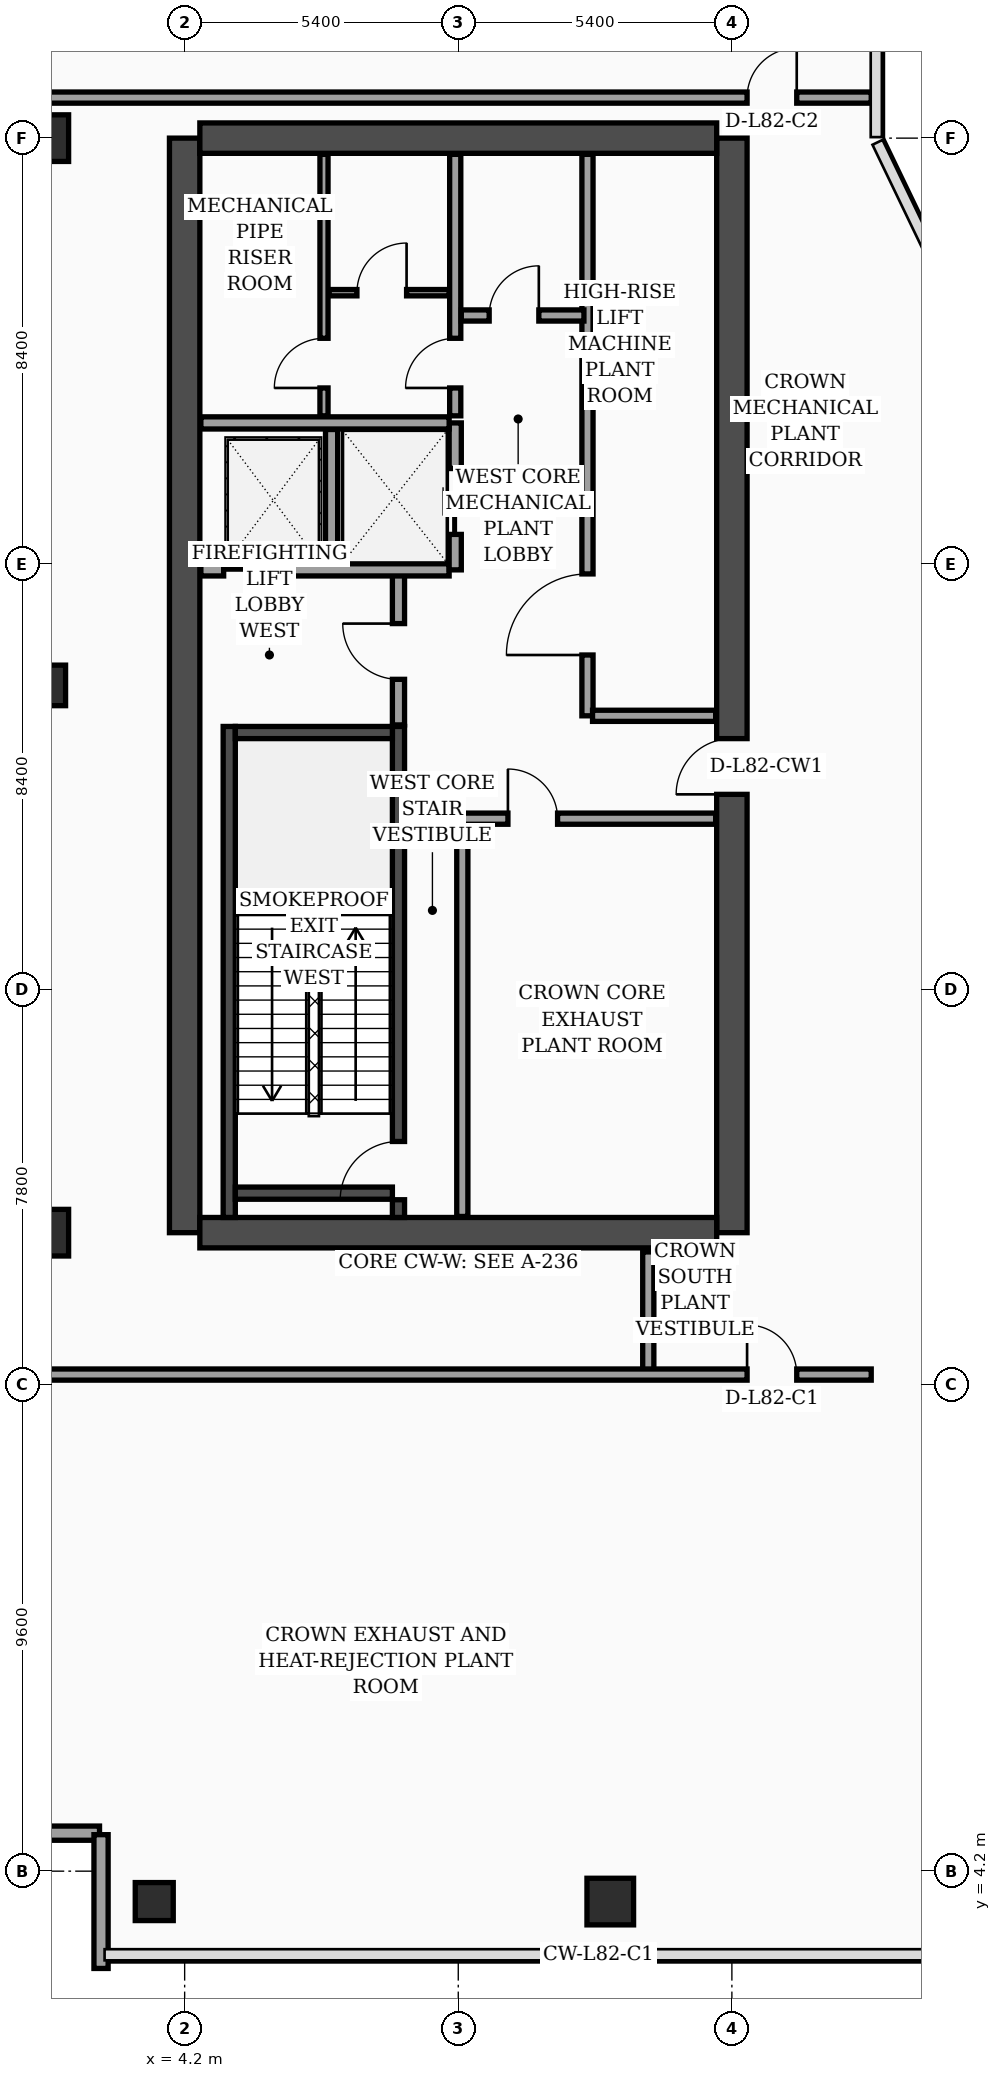
"""IFC4 building model, lengths in metres.
Left out: names, types, materials, properties, quantities, classifications, styles, units other than length and angle.
Written with IfcOpenShell. Run it as: python <this file> out.ifc"""

import sys

from ifc_helpers import new_model, si_unit, direction, frame, frame_2d, origin, origin_2d, place, context, subcontext, project, spatial, rectangle, hollow_rectangle, extrude, element, fill, save


model = new_model("IFC4")
c1 = context("Model", 3, precision=1e-05, world=origin(), true_north=direction((0.0, 1.0)))
c2 = subcontext(c1, "Body", "Model", "MODEL_VIEW")
j1 = project(units=[si_unit("LENGTHUNIT", "METRE"), si_unit("PLANEANGLEUNIT", "RADIAN")], contexts=[c1])
p1 = place(None, origin())
s1 = spatial("IfcSite", under=j1, at=p1, CompositionType="ELEMENT")
p2 = place(p1, origin())
s2 = spatial("IfcBuilding", under=s1, at=p2, CompositionType="ELEMENT")
p3 = place(p2, frame((0.0, 0.0, 335.5)))
s3 = spatial("IfcBuildingStorey", under=s2, at=p3, CompositionType="ELEMENT", Elevation=335.5)
p4 = place(p3, frame((4.2, 16.8, 0.0), z_axis=(0.0, 0.0, 1.0), x_axis=(0.0, 1.0, 0.0)))
e1 = element("IfcWall", 1, at=p4, inside=s3, PredefinedType="SHEAR", context=c2, shape_type="SweptSolid", body=[
    extrude(rectangle(XDim=21.6, YDim=0.6, at=frame_2d((10.8, 0.0))), origin(), (0.0, 0.0, 1.0), 4.76),
])
p5 = place(p3, frame((15.0, 16.8, 0.0), z_axis=(0.0, 0.0, 1.0), x_axis=(0.0, 1.0, 0.0)))
e2 = element("IfcWall", 2, at=p5, inside=s3, PredefinedType="SHEAR", context=c2, shape_type="SweptSolid", body=[
    extrude(rectangle(XDim=21.6, YDim=0.6, at=frame_2d((10.8, 0.0))), origin(), (0.0, 0.0, 1.0), 4.76),
])
p6 = place(p5, frame((8.65, 0.0, 0.0)))
e3 = element("IfcOpeningElement", 3, at=p6, cuts=e2, PredefinedType="OPENING", context=c2, shape_type="SweptSolid", body=[
    extrude(rectangle(XDim=1.1, YDim=2.2, at=frame_2d((0.55, 1.1))), frame((0.0, 0.31, 0.0), z_axis=(0.0, -1.0, 0.0), x_axis=(1.0, 0.0, 0.0)), (0.0, 0.0, 1.0), 0.62),
])
for number, where, z_axis, x_axis in (
    (4, (4.5, 38.4, 0.0), (0.0, 0.0, 1.0), (1.0, 0.0, 0.0)),
    (5, (4.5, 16.8, 0.0), (0.0, 0.0, 1.0), (1.0, 0.0, 0.0)),
):
    element("IfcWall", number, at=place(p3, frame(where, z_axis=z_axis, x_axis=x_axis)), inside=s3, PredefinedType="SHEAR", context=c2, shape_type="SweptSolid", body=[
        extrude(rectangle(XDim=10.2, YDim=0.6, at=frame_2d((5.1, 0.0))), origin(), (0.0, 0.0, 1.0), 4.76),
    ])
p7 = place(p3, frame((5.08, 17.1, 0.0), z_axis=(0.0, 0.0, 1.0), x_axis=(0.0, 1.0, 0.0)))
e6 = element("IfcWall", 6, at=p7, inside=s3, PredefinedType="SOLIDWALL", context=c2, shape_type="SweptSolid", body=[
    extrude(rectangle(XDim=9.69, YDim=0.24, at=frame_2d((4.845, 0.0))), origin(), (0.0, 0.0, 1.0), 4.76),
])
p8 = place(p3, frame((8.42, 17.1, 0.0), z_axis=(0.0, 0.0, 1.0), x_axis=(0.0, 1.0, 0.0)))
e7 = element("IfcWall", 7, at=p8, inside=s3, PredefinedType="SOLIDWALL", context=c2, shape_type="SweptSolid", body=[
    extrude(rectangle(XDim=9.69, YDim=0.24, at=frame_2d((4.845, 0.0))), origin(), (0.0, 0.0, 1.0), 4.76),
])
p9 = place(p8, frame((0.35, 0.0, 0.0)))
e8 = element("IfcOpeningElement", 8, at=p9, cuts=e7, PredefinedType="OPENING", context=c2, shape_type="SweptSolid", body=[
    extrude(rectangle(XDim=1.15, YDim=2.2, at=frame_2d((0.575, 1.1))), frame((0.0, 0.13, 0.0), z_axis=(0.0, -1.0, 0.0), x_axis=(1.0, 0.0, 0.0)), (0.0, 0.0, 1.0), 0.26),
])
for number, where, z_axis, x_axis in (
    (9, (5.2, 17.58, 0.0), (0.0, 0.0, 1.0), (1.0, 0.0, 0.0)),
    (10, (5.2, 26.67, 0.0), (0.0, 0.0, 1.0), (1.0, 0.0, 0.0)),
):
    element("IfcWall", number, at=place(p3, frame(where, z_axis=z_axis, x_axis=x_axis)), inside=s3, PredefinedType="SOLIDWALL", context=c2, shape_type="SweptSolid", body=[
        extrude(rectangle(XDim=3.1, YDim=0.24, at=frame_2d((1.55, 0.0))), origin(), (0.0, 0.0, 1.0), 4.76),
    ])
p10 = place(p3, frame((3.6, 3.6, 0.0), z_axis=(0.0, 0.0, 1.0), x_axis=(1.0, 0.0, 0.0)))
e11 = element("IfcColumn", 11, at=p10, inside=s3, PredefinedType="COLUMN", context=c2, shape_type="SweptSolid", body=[
    extrude(hollow_rectangle(XDim=0.75, YDim=0.75, WallThickness=0.032, at=origin_2d()), origin(), (0.0, 0.0, 1.0), 4.76),
])
p11 = place(p3, frame((1.45, 16.8, 0.0), z_axis=(0.0, 0.0, 1.0), x_axis=(1.0, 0.0, 0.0)))
e12 = element("IfcColumn", 12, at=p11, inside=s3, PredefinedType="COLUMN", context=c2, shape_type="SweptSolid", body=[
    extrude(rectangle(XDim=0.92, YDim=0.92, at=origin_2d()), origin(), (0.0, 0.0, 1.0), 4.76),
])
p12 = place(p3, frame((1.45, 27.6, 0.0), z_axis=(0.0, 0.0, 1.0), x_axis=(1.0, 0.0, 0.0)))
e13 = element("IfcColumn", 13, at=p12, inside=s3, PredefinedType="COLUMN", context=c2, shape_type="SweptSolid", body=[
    extrude(rectangle(XDim=0.8, YDim=0.8, at=origin_2d()), origin(), (0.0, 0.0, 1.0), 4.76),
])
for number, where, z_axis, x_axis in (
    (14, (1.45, 38.4, 0.0), (0.0, 0.0, 1.0), (1.0, 0.0, 0.0)),
    (15, (12.6, 3.6, 0.0), (0.0, 0.0, 1.0), (1.0, 0.0, 0.0)),
):
    element("IfcColumn", number, at=place(p3, frame(where, z_axis=z_axis, x_axis=x_axis)), inside=s3, PredefinedType="COLUMN", context=c2, shape_type="SweptSolid", body=[
        extrude(rectangle(XDim=0.92, YDim=0.92, at=origin_2d()), origin(), (0.0, 0.0, 1.0), 4.76),
    ])
p13 = place(p3, frame((-0.12, 4.95, 0.0), z_axis=(0.0, 0.0, 1.0), x_axis=(1.0, 0.0, 0.0)))
e16 = element("IfcWall", 16, at=p13, inside=s3, PredefinedType="SOLIDWALL", context=c2, shape_type="SweptSolid", body=[
    extrude(rectangle(XDim=2.64, YDim=0.28, at=frame_2d((1.32, 0.0))), origin(), (0.0, 0.0, 1.0), 4.76),
])
p14 = place(p3, frame((2.55, 4.92, 0.0), z_axis=(0.0, 0.0, 1.0), x_axis=(0.0, -1.0, 0.0)))
e17 = element("IfcWall", 17, at=p14, inside=s3, PredefinedType="SOLIDWALL", context=c2, shape_type="SweptSolid", body=[
    extrude(rectangle(XDim=2.64, YDim=0.28, at=frame_2d((1.32, 0.0))), origin(), (0.0, 0.0, 1.0), 4.76),
])
p15 = place(p3, frame((8.42, 26.82, 0.0), z_axis=(0.0, 0.0, 1.0), x_axis=(0.0, 1.0, 0.0)))
e18 = element("IfcWall", 18, at=p15, inside=s3, PredefinedType="SOLIDWALL", context=c2, shape_type="SweptSolid", body=[
    extrude(rectangle(XDim=3.0, YDim=0.24, at=frame_2d((1.5, 0.0))), origin(), (0.0, 0.0, 1.0), 4.76),
])
p16 = place(p15, frame((0.9, 0.0, 0.0)))
e19 = element("IfcOpeningElement", 19, at=p16, cuts=e18, PredefinedType="OPENING", context=c2, shape_type="SweptSolid", body=[
    extrude(rectangle(XDim=1.1, YDim=2.2, at=frame_2d((0.55, 1.1))), frame((0.0, 0.13, 0.0), z_axis=(0.0, -1.0, 0.0), x_axis=(1.0, 0.0, 0.0)), (0.0, 0.0, 1.0), 0.26),
])
p17 = place(p3, frame((4.52, 29.88, 0.0), z_axis=(0.0, 0.0, 1.0), x_axis=(1.0, 0.0, 0.0)))
e20 = element("IfcWall", 20, at=p17, inside=s3, PredefinedType="SOLIDWALL", context=c2, shape_type="SweptSolid", body=[
    extrude(rectangle(XDim=4.9, YDim=0.24, at=frame_2d((2.45, 0.0))), origin(), (0.0, 0.0, 1.0), 4.76),
])
p18 = place(p17, frame((0.45, 0.0, 0.0)))
e21 = element("IfcOpeningElement", 21, at=p18, cuts=e20, PredefinedType="OPENING", context=c2, shape_type="SweptSolid", body=[
    extrude(rectangle(XDim=1.3, YDim=2.35, at=frame_2d((0.65, 1.175))), frame((0.0, 0.13, 0.0), z_axis=(0.0, -1.0, 0.0), x_axis=(1.0, 0.0, 0.0)), (0.0, 0.0, 1.0), 0.26),
])
p19 = place(p3, frame((7.1, 30.02, 0.0), z_axis=(0.0, 0.0, 1.0), x_axis=(0.0, 1.0, 0.0)))
e22 = element("IfcWall", 22, at=p19, inside=s3, PredefinedType="SOLIDWALL", context=c2, shape_type="SweptSolid", body=[
    extrude(rectangle(XDim=2.63, YDim=0.24, at=frame_2d((1.315, 0.0))), origin(), (0.0, 0.0, 1.0), 4.76),
])
p20 = place(p3, frame((9.54, 29.88, 0.0), z_axis=(0.0, 0.0, 1.0), x_axis=(0.0, 1.0, 0.0)))
e23 = element("IfcWall", 23, at=p20, inside=s3, PredefinedType="SOLIDWALL", context=c2, shape_type="SweptSolid", body=[
    extrude(rectangle(XDim=2.9, YDim=0.24, at=frame_2d((1.45, 0.0))), origin(), (0.0, 0.0, 1.0), 4.76),
])
p21 = place(p20, frame((0.7, 0.0, 0.0)))
e24 = element("IfcOpeningElement", 24, at=p21, cuts=e23, PredefinedType="OPENING", context=c2, shape_type="SweptSolid", body=[
    extrude(rectangle(XDim=1.3, YDim=2.35, at=frame_2d((0.65, 1.175))), frame((0.0, 0.13, 0.0), z_axis=(0.0, -1.0, 0.0), x_axis=(1.0, 0.0, 0.0)), (0.0, 0.0, 1.0), 0.26),
])
p22 = place(p3, frame((4.52, 32.78, 0.0), z_axis=(0.0, 0.0, 1.0), x_axis=(1.0, 0.0, 0.0)))
e25 = element("IfcWall", 25, at=p22, inside=s3, PredefinedType="SOLIDWALL", context=c2, shape_type="SweptSolid", body=[
    extrude(rectangle(XDim=4.9, YDim=0.24, at=frame_2d((2.45, 0.0))), origin(), (0.0, 0.0, 1.0), 4.76),
])
p23 = place(p3, frame((9.68, 17.12, 0.0), z_axis=(0.0, 0.0, 1.0), x_axis=(0.0, 1.0, 0.0)))
e26 = element("IfcWall", 26, at=p23, inside=s3, PredefinedType="SOLIDWALL", context=c2, shape_type="SweptSolid", body=[
    extrude(rectangle(XDim=7.88, YDim=0.22, at=frame_2d((3.94, 0.0))), origin(), (0.0, 0.0, 1.0), 4.76),
])
p24 = place(p3, frame((6.95, 32.92, 0.0), z_axis=(0.0, 0.0, 1.0), x_axis=(0.0, 1.0, 0.0)))
e27 = element("IfcWall", 27, at=p24, inside=s3, PredefinedType="PARTITIONING", context=c2, shape_type="SweptSolid", body=[
    extrude(rectangle(XDim=5.16, YDim=0.16, at=frame_2d((2.58, 0.0))), origin(), (0.0, 0.0, 1.0), 4.76),
])
p25 = place(p24, frame((0.55, 0.0, 0.0)))
e28 = element("IfcOpeningElement", 28, at=p25, cuts=e27, PredefinedType="OPENING", context=c2, shape_type="SweptSolid", body=[
    extrude(rectangle(XDim=0.98, YDim=2.15, at=frame_2d((0.49, 1.075))), frame((0.0, 0.09, 0.0), z_axis=(0.0, -1.0, 0.0), x_axis=(1.0, 0.0, 0.0)), (0.0, 0.0, 1.0), 0.18),
])
p26 = place(p3, frame((7.05, 35.35, 0.0), z_axis=(0.0, 0.0, 1.0), x_axis=(1.0, 0.0, 0.0)))
e29 = element("IfcWall", 29, at=p26, inside=s3, PredefinedType="PARTITIONING", context=c2, shape_type="SweptSolid", body=[
    extrude(rectangle(XDim=2.37, YDim=0.125, at=frame_2d((1.185, 0.0))), origin(), (0.0, 0.0, 1.0), 4.76),
])
p27 = place(p26, frame((0.55, 0.0, 0.0)))
e30 = element("IfcOpeningElement", 30, at=p27, cuts=e29, PredefinedType="OPENING", context=c2, shape_type="SweptSolid", body=[
    extrude(rectangle(XDim=0.98, YDim=2.15, at=frame_2d((0.49, 1.075))), frame((0.0, 0.073, 0.0), z_axis=(0.0, -1.0, 0.0), x_axis=(1.0, 0.0, 0.0)), (0.0, 0.0, 1.0), 0.145),
])
p28 = place(p3, frame((9.54, 32.92, 0.0), z_axis=(0.0, 0.0, 1.0), x_axis=(0.0, 1.0, 0.0)))
e31 = element("IfcWall", 31, at=p28, inside=s3, PredefinedType="SOLIDWALL", context=c2, shape_type="SweptSolid", body=[
    extrude(rectangle(XDim=5.16, YDim=0.22, at=frame_2d((2.58, 0.0))), origin(), (0.0, 0.0, 1.0), 4.76),
])
p29 = place(p28, frame((0.55, 0.0, 0.0)))
e32 = element("IfcOpeningElement", 32, at=p29, cuts=e31, PredefinedType="OPENING", context=c2, shape_type="SweptSolid", body=[
    extrude(rectangle(XDim=0.98, YDim=2.15, at=frame_2d((0.49, 1.075))), frame((0.0, 0.12, 0.0), z_axis=(0.0, -1.0, 0.0), x_axis=(1.0, 0.0, 0.0)), (0.0, 0.0, 1.0), 0.24),
])
p30 = place(p3, frame((9.68, 24.97, 0.0), z_axis=(0.0, 0.0, 1.0), x_axis=(1.0, 0.0, 0.0)))
e33 = element("IfcWall", 33, at=p30, inside=s3, PredefinedType="SOLIDWALL", context=c2, shape_type="SweptSolid", body=[
    extrude(rectangle(XDim=5.0, YDim=0.22, at=frame_2d((2.5, 0.0))), origin(), (0.0, 0.0, 1.0), 4.76),
])
p31 = place(p30, frame((0.9, 0.0, 0.0)))
e34 = element("IfcOpeningElement", 34, at=p31, cuts=e33, PredefinedType="OPENING", context=c2, shape_type="SweptSolid", body=[
    extrude(rectangle(XDim=0.98, YDim=2.15, at=frame_2d((0.49, 1.075))), frame((0.0, 0.12, 0.0), z_axis=(0.0, -1.0, 0.0), x_axis=(1.0, 0.0, 0.0)), (0.0, 0.0, 1.0), 0.24),
])
p32 = place(p3, frame((12.15, 27.0, 0.0), z_axis=(0.0, 0.0, 1.0), x_axis=(0.0, 1.0, 0.0)))
e35 = element("IfcWall", 35, at=p32, inside=s3, PredefinedType="SOLIDWALL", context=c2, shape_type="SweptSolid", body=[
    extrude(rectangle(XDim=11.08, YDim=0.22, at=frame_2d((5.54, 0.0))), origin(), (0.0, 0.0, 1.0), 4.76),
])
p33 = place(p32, frame((1.2, 0.0, 0.0)))
e36 = element("IfcOpeningElement", 36, at=p33, cuts=e35, PredefinedType="OPENING", context=c2, shape_type="SweptSolid", body=[
    extrude(rectangle(XDim=1.6, YDim=2.35, at=frame_2d((0.8, 1.175))), frame((0.0, 0.12, 0.0), z_axis=(0.0, -1.0, 0.0), x_axis=(1.0, 0.0, 0.0)), (0.0, 0.0, 1.0), 0.24),
])
p34 = place(p3, frame((12.25, 27.0, 0.0), z_axis=(0.0, 0.0, 1.0), x_axis=(1.0, 0.0, 0.0)))
e37 = element("IfcWall", 37, at=p34, inside=s3, PredefinedType="SOLIDWALL", context=c2, shape_type="SweptSolid", body=[
    extrude(rectangle(XDim=2.43, YDim=0.22, at=frame_2d((1.215, 0.0))), origin(), (0.0, 0.0, 1.0), 4.76),
])
p35 = place(p3, frame((9.66, 34.9, 0.0), z_axis=(0.0, 0.0, 1.0), x_axis=(1.0, 0.0, 0.0)))
e38 = element("IfcWall", 38, at=p35, inside=s3, PredefinedType="SOLIDWALL", context=c2, shape_type="SweptSolid", body=[
    extrude(rectangle(XDim=2.42, YDim=0.22, at=frame_2d((1.21, 0.0))), origin(), (0.0, 0.0, 1.0), 4.76),
])
p36 = place(p35, frame((0.55, 0.0, 0.0)))
e39 = element("IfcOpeningElement", 39, at=p36, cuts=e38, PredefinedType="OPENING", context=c2, shape_type="SweptSolid", body=[
    extrude(rectangle(XDim=0.98, YDim=2.15, at=frame_2d((0.49, 1.075))), frame((0.0, 0.12, 0.0), z_axis=(0.0, -1.0, 0.0), x_axis=(1.0, 0.0, 0.0)), (0.0, 0.0, 1.0), 0.24),
])
p37 = place(p3, frame((13.35, 14.0, 0.0), z_axis=(0.0, 0.0, 1.0), x_axis=(0.0, 1.0, 0.0)))
e40 = element("IfcWall", 40, at=p37, inside=s3, PredefinedType="SOLIDWALL", context=c2, shape_type="SweptSolid", body=[
    extrude(rectangle(XDim=2.42, YDim=0.22, at=frame_2d((1.21, 0.0))), origin(), (0.0, 0.0, 1.0), 4.76),
])
p38 = place(p3, frame((0.08, 14.0, 0.0), z_axis=(0.0, 0.0, 1.0), x_axis=(1.0, 0.0, 0.0)))
e41 = element("IfcWall", 41, at=p38, inside=s3, PredefinedType="SOLIDWALL", context=c2, shape_type="SweptSolid", body=[
    extrude(rectangle(XDim=17.67, YDim=0.22, at=frame_2d((8.835, 0.0))), origin(), (0.0, 0.0, 1.0), 4.19),
])
p39 = place(p38, frame((15.22, 0.0, 0.0)))
e42 = element("IfcOpeningElement", 42, at=p39, cuts=e41, PredefinedType="OPENING", context=c2, shape_type="SweptSolid", body=[
    extrude(rectangle(XDim=0.98, YDim=2.15, at=frame_2d((0.49, 1.075))), frame((0.0, 0.12, 0.0), z_axis=(0.0, -1.0, 0.0), x_axis=(1.0, 0.0, 0.0)), (0.0, 0.0, 1.0), 0.24),
])
p40 = place(p3, frame((0.08, 39.2, 0.0), z_axis=(0.0, 0.0, 1.0), x_axis=(1.0, 0.0, 0.0)))
e43 = element("IfcWall", 43, at=p40, inside=s3, PredefinedType="SOLIDWALL", context=c2, shape_type="SweptSolid", body=[
    extrude(rectangle(XDim=17.67, YDim=0.22, at=frame_2d((8.835, 0.0))), origin(), (0.0, 0.0, 1.0), 4.19),
])
p41 = place(p40, frame((15.22, 0.0, 0.0)))
e44 = element("IfcOpeningElement", 44, at=p41, cuts=e43, PredefinedType="OPENING", context=c2, shape_type="SweptSolid", body=[
    extrude(rectangle(XDim=0.98, YDim=2.15, at=frame_2d((0.49, 1.075))), frame((0.0, 0.12, 0.0), z_axis=(0.0, -1.0, 0.0), x_axis=(1.0, 0.0, 0.0)), (0.0, 0.0, 1.0), 0.24),
])
p42 = place(p16, origin())
e45 = element("IfcDoor", 45, at=p42, inside=s3, OperationType="SINGLE_SWING_RIGHT", PredefinedType="DOOR", context=c2, shape_type="SweptSolid", body=[
    extrude(rectangle(XDim=1.1, YDim=2.2, at=frame_2d((0.55, 1.1))), frame((0.0, 0.025, 0.0), z_axis=(0.0, -1.0, 0.0), x_axis=(1.0, 0.0, 0.0)), (0.0, 0.0, 1.0), 0.05),
])
fill(e19, e45)
p43 = place(p18, origin())
e46 = element("IfcDoor", 46, at=p43, inside=s3, OperationType="DOUBLE_DOOR_SLIDING", PredefinedType="DOOR", context=c2, shape_type="SweptSolid", body=[
    extrude(rectangle(XDim=1.3, YDim=2.35, at=frame_2d((0.65, 1.175))), frame((0.0, 0.025, 0.0), z_axis=(0.0, -1.0, 0.0), x_axis=(1.0, 0.0, 0.0)), (0.0, 0.0, 1.0), 0.05),
])
fill(e21, e46)
p44 = place(p21, origin())
e47 = element("IfcDoor", 47, at=p44, inside=s3, OperationType="DOUBLE_DOOR_SLIDING", PredefinedType="DOOR", context=c2, shape_type="SweptSolid", body=[
    extrude(rectangle(XDim=1.3, YDim=2.35, at=frame_2d((0.65, 1.175))), frame((0.0, 0.025, 0.0), z_axis=(0.0, -1.0, 0.0), x_axis=(1.0, 0.0, 0.0)), (0.0, 0.0, 1.0), 0.05),
])
fill(e24, e47)
p45 = place(p25, origin())
e48 = element("IfcDoor", 48, at=p45, inside=s3, OperationType="SINGLE_SWING_LEFT", PredefinedType="DOOR", context=c2, shape_type="SweptSolid", body=[
    extrude(rectangle(XDim=0.98, YDim=2.15, at=frame_2d((0.49, 1.075))), frame((0.0, 0.025, 0.0), z_axis=(0.0, -1.0, 0.0), x_axis=(1.0, 0.0, 0.0)), (0.0, 0.0, 1.0), 0.05),
])
fill(e28, e48)
p46 = place(p27, origin())
e49 = element("IfcDoor", 49, at=p46, inside=s3, OperationType="SINGLE_SWING_RIGHT", PredefinedType="DOOR", context=c2, shape_type="SweptSolid", body=[
    extrude(rectangle(XDim=0.98, YDim=2.15, at=frame_2d((0.49, 1.075))), frame((0.0, 0.025, 0.0), z_axis=(0.0, -1.0, 0.0), x_axis=(1.0, 0.0, 0.0)), (0.0, 0.0, 1.0), 0.05),
])
fill(e30, e49)
p47 = place(p29, origin())
e50 = element("IfcDoor", 50, at=p47, inside=s3, OperationType="SINGLE_SWING_LEFT", PredefinedType="DOOR", context=c2, shape_type="SweptSolid", body=[
    extrude(rectangle(XDim=0.98, YDim=2.15, at=frame_2d((0.49, 1.075))), frame((0.0, 0.025, 0.0), z_axis=(0.0, -1.0, 0.0), x_axis=(1.0, 0.0, 0.0)), (0.0, 0.0, 1.0), 0.05),
])
fill(e32, e50)
p48 = place(p31, origin())
e51 = element("IfcDoor", 51, at=p48, inside=s3, OperationType="SINGLE_SWING_LEFT", PredefinedType="DOOR", context=c2, shape_type="SweptSolid", body=[
    extrude(rectangle(XDim=0.98, YDim=2.15, at=frame_2d((0.49, 1.075))), frame((0.0, 0.025, 0.0), z_axis=(0.0, -1.0, 0.0), x_axis=(1.0, 0.0, 0.0)), (0.0, 0.0, 1.0), 0.05),
])
fill(e34, e51)
p49 = place(p33, origin())
e52 = element("IfcDoor", 52, at=p49, inside=s3, OperationType="SINGLE_SWING_LEFT", PredefinedType="DOOR", context=c2, shape_type="SweptSolid", body=[
    extrude(rectangle(XDim=1.6, YDim=2.35, at=frame_2d((0.8, 1.175))), frame((0.0, 0.025, 0.0), z_axis=(0.0, -1.0, 0.0), x_axis=(1.0, 0.0, 0.0)), (0.0, 0.0, 1.0), 0.05),
])
fill(e36, e52)
p50 = place(p36, origin())
e53 = element("IfcDoor", 53, at=p50, inside=s3, OperationType="SINGLE_SWING_RIGHT", PredefinedType="DOOR", context=c2, shape_type="SweptSolid", body=[
    extrude(rectangle(XDim=0.98, YDim=2.15, at=frame_2d((0.49, 1.075))), frame((0.0, 0.025, 0.0), z_axis=(0.0, -1.0, 0.0), x_axis=(1.0, 0.0, 0.0)), (0.0, 0.0, 1.0), 0.05),
])
fill(e39, e53)
p51 = place(p39, origin())
e54 = element("IfcDoor", 54, at=p51, inside=s3, OperationType="SINGLE_SWING_LEFT", PredefinedType="DOOR", context=c2, shape_type="SweptSolid", body=[
    extrude(rectangle(XDim=0.98, YDim=2.15, at=frame_2d((0.49, 1.075))), frame((0.0, 0.025, 0.0), z_axis=(0.0, -1.0, 0.0), x_axis=(1.0, 0.0, 0.0)), (0.0, 0.0, 1.0), 0.05),
])
fill(e42, e54)
p52 = place(p41, origin())
e55 = element("IfcDoor", 55, at=p52, inside=s3, OperationType="SINGLE_SWING_RIGHT", PredefinedType="DOOR", context=c2, shape_type="SweptSolid", body=[
    extrude(rectangle(XDim=0.98, YDim=2.15, at=frame_2d((0.49, 1.075))), frame((0.0, 0.025, 0.0), z_axis=(0.0, -1.0, 0.0), x_axis=(1.0, 0.0, 0.0)), (0.0, 0.0, 1.0), 0.05),
])
fill(e44, e55)
p53 = place(p9, origin())
e56 = element("IfcDoor", 56, at=p53, inside=s3, OperationType="SINGLE_SWING_LEFT", PredefinedType="DOOR", context=c2, shape_type="SweptSolid", body=[
    extrude(rectangle(XDim=1.15, YDim=2.2, at=frame_2d((0.575, 1.1))), frame((0.0, 0.025, 0.0), z_axis=(0.0, -1.0, 0.0), x_axis=(1.0, 0.0, 0.0)), (0.0, 0.0, 1.0), 0.05),
])
fill(e8, e56)
p54 = place(p6, origin())
e57 = element("IfcDoor", 57, at=p54, inside=s3, OperationType="SINGLE_SWING_LEFT", PredefinedType="DOOR", context=c2, shape_type="SweptSolid", body=[
    extrude(rectangle(XDim=1.1, YDim=2.2, at=frame_2d((0.55, 1.1))), frame((0.0, 0.025, 0.0), z_axis=(0.0, -1.0, 0.0), x_axis=(1.0, 0.0, 0.0)), (0.0, 0.0, 1.0), 0.05),
])
fill(e3, e57)
save(model, sys.argv[1])
